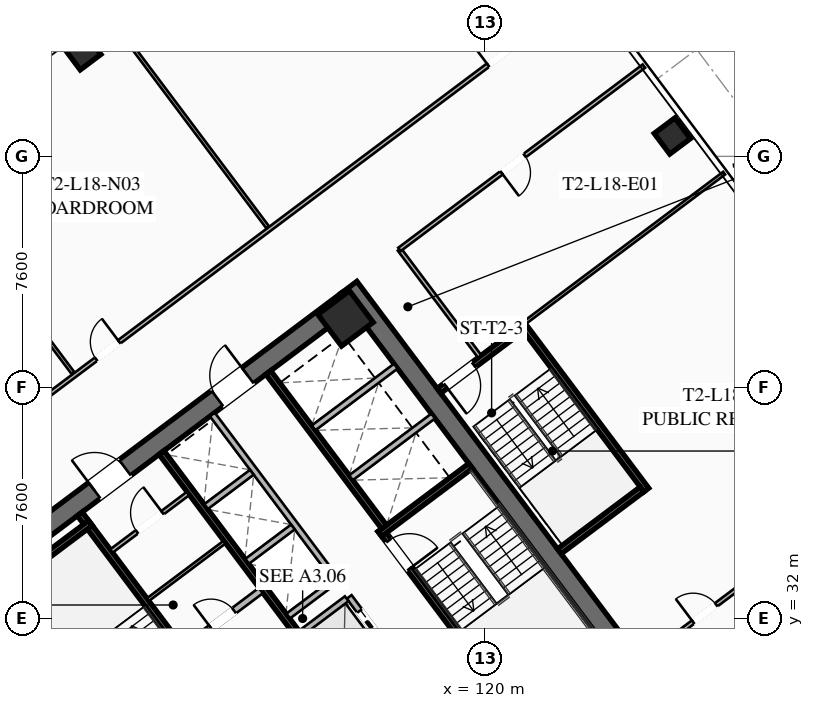
"""IFC4 building model, lengths in metres.
Left out: names, types, materials, properties, quantities, classifications, styles, units other than length and angle.
Written with IfcOpenShell. Run it as: python <this file> out.ifc"""

import sys

from ifc_helpers import new_model, si_unit, direction, frame, frame_2d, origin, origin_2d, place, context, subcontext, project, spatial, rectangle, hollow_rectangle, extrude, element, fill, save


model = new_model("IFC4")
c1 = context("Model", 3, precision=1e-05, world=origin(), true_north=direction((0.0, 1.0)))
c2 = subcontext(c1, "Body", "Model", "MODEL_VIEW")
j1 = project(units=[si_unit("LENGTHUNIT", "METRE"), si_unit("PLANEANGLEUNIT", "RADIAN")], contexts=[c1])
p1 = place(None, origin())
s1 = spatial("IfcSite", under=j1, at=p1, CompositionType="ELEMENT")
p2 = place(p1, origin())
s2 = spatial("IfcBuilding", under=s1, at=p2, CompositionType="ELEMENT")
p3 = place(p2, frame((0.0, 0.0, 70.75)))
s3 = spatial("IfcBuildingStorey", under=s2, at=p3, CompositionType="ELEMENT", Elevation=70.75)
for number, where, z_axis, x_axis in (
    (1, (112.476, 21.107, 0.0), (0.0, 0.0, 1.0), (-0.6, 0.8, 0.0)),
    (2, (115.524, 42.893, 0.0), (0.0, 0.0, 1.0), (0.6, -0.8, 0.0)),
):
    element("IfcWall", number, at=place(p3, frame(where, z_axis=z_axis, x_axis=x_axis)), inside=s3, PredefinedType="SHEAR", context=c2, shape_type="SweptSolid", body=[
        extrude(rectangle(XDim=15.6, YDim=0.65, at=frame_2d((7.8, 0.0))), origin(), (0.0, 0.0, 1.0), 3.55),
    ])
p4 = place(p3, frame((103.571, 33.522, 0.0), z_axis=(0.0, 0.0, 1.0), x_axis=(0.799998028465, 0.600002628705, 0.0)))
e3 = element("IfcWall", 3, at=p4, inside=s3, PredefinedType="SHEAR", context=c2, shape_type="SweptSolid", body=[
    extrude(rectangle(XDim=14.86, YDim=0.65, at=frame_2d((7.43, 0.0))), origin(), (0.0, 0.0, 1.0), 3.55),
])
p5 = place(p4, frame((4.48, 0.0, 0.0)))
e4 = element("IfcOpeningElement", 4, at=p5, cuts=e3, PredefinedType="OPENING", context=c2, shape_type="SweptSolid", body=[
    extrude(rectangle(XDim=1.25, YDim=2.25, at=frame_2d((0.625, 1.125))), frame((0.0, 0.335, 0.0), z_axis=(0.0, -1.0, 0.0), x_axis=(1.0, 0.0, 0.0)), (0.0, 0.0, 1.0), 0.67),
])
p6 = place(p4, frame((9.53, 0.0, 0.0)))
e5 = element("IfcOpeningElement", 5, at=p6, cuts=e3, PredefinedType="OPENING", context=c2, shape_type="SweptSolid", body=[
    extrude(rectangle(XDim=1.25, YDim=2.25, at=frame_2d((0.625, 1.125))), frame((0.0, 0.335, 0.0), z_axis=(0.0, -1.0, 0.0), x_axis=(1.0, 0.0, 0.0)), (0.0, 0.0, 1.0), 0.67),
])
p7 = place(p3, frame((115.41, 41.87, 0.0), z_axis=(0.0, 0.0, 1.0), x_axis=(0.799999996291, 0.600000004945, 0.0)))
e6 = element("IfcColumn", 6, at=p7, inside=s3, PredefinedType="COLUMN", context=c2, shape_type="SweptSolid", body=[
    extrude(hollow_rectangle(XDim=1.3, YDim=1.3, WallThickness=0.05, at=origin_2d()), origin(), (0.0, 0.0, 1.0), 3.35),
])
for number, where, z_axis, x_axis in (
    (7, (126.16, 47.87, 0.0), (0.0, 0.0, 1.0), (0.8, 0.6, 0.0)),
    (8, (106.77, 50.64, 0.0), (0.0, 0.0, 1.0), (0.8, 0.6, 0.0)),
):
    element("IfcColumn", number, at=place(p3, frame(where, z_axis=z_axis, x_axis=x_axis)), inside=s3, PredefinedType="COLUMN", context=c2, shape_type="SweptSolid", body=[
        extrude(hollow_rectangle(XDim=0.85, YDim=0.85, WallThickness=0.035, at=origin_2d()), origin(), (0.0, 0.0, 1.0), 3.35),
    ])
p8 = place(p3, frame((111.44, 29.08, 0.0), z_axis=(0.0, 0.0, 1.0), x_axis=(-0.600009827119, 0.799992629566, 0.0)))
e9 = element("IfcWall", 9, at=p8, inside=s3, PredefinedType="SHEAR", context=c2, shape_type="SweptSolid", body=[
    extrude(rectangle(XDim=7.95, YDim=0.2, at=frame_2d((3.975, 0.0))), origin(), (0.0, 0.0, 1.0), 3.35),
])
p9 = place(p8, frame((0.45, 0.0, 0.0)))
e10 = element("IfcOpeningElement", 10, at=p9, cuts=e9, PredefinedType="OPENING", context=c2, shape_type="SweptSolid", body=[
    extrude(rectangle(XDim=1.15, YDim=2.2, at=frame_2d((0.575, 1.1))), frame((0.0, 0.11, 0.0), z_axis=(0.0, -1.0, 0.0), x_axis=(1.0, 0.0, 0.0)), (0.0, 0.0, 1.0), 0.22),
])
p10 = place(p3, frame((104.036, 32.902, 0.0), z_axis=(0.0, 0.0, 1.0), x_axis=(0.800039270442, 0.59994763584, 0.0)))
e11 = element("IfcWall", 11, at=p10, inside=s3, PredefinedType="SHEAR", context=c2, shape_type="SweptSolid", body=[
    extrude(rectangle(XDim=3.73, YDim=0.2, at=frame_2d((1.865, 0.0))), origin(), (0.0, 0.0, 1.0), 3.35),
])
p11 = place(p3, frame((116.56, 34.92, 0.0), z_axis=(0.0, 0.0, 1.0), x_axis=(0.600009827119, -0.799992629566, 0.0)))
e12 = element("IfcWall", 12, at=p11, inside=s3, PredefinedType="SHEAR", context=c2, shape_type="SweptSolid", body=[
    extrude(rectangle(XDim=7.95, YDim=0.2, at=frame_2d((3.975, 0.0))), origin(), (0.0, 0.0, 1.0), 3.35),
])
p12 = place(p11, frame((0.45, 0.0, 0.0)))
e13 = element("IfcOpeningElement", 13, at=p12, cuts=e12, PredefinedType="OPENING", context=c2, shape_type="SweptSolid", body=[
    extrude(rectangle(XDim=1.15, YDim=2.2, at=frame_2d((0.575, 1.1))), frame((0.0, 0.11, 0.0), z_axis=(0.0, -1.0, 0.0), x_axis=(1.0, 0.0, 0.0)), (0.0, 0.0, 1.0), 0.22),
])
p13 = place(p3, frame((116.54, 34.78, 0.0), z_axis=(0.0, 0.0, 1.0), x_axis=(0.799984290658, 0.600020945218, 0.0)))
e14 = element("IfcWall", 14, at=p13, inside=s3, PredefinedType="SHEAR", context=c2, shape_type="SweptSolid", body=[
    extrude(rectangle(XDim=3.73, YDim=0.2, at=frame_2d((1.865, 0.0))), origin(), (0.0, 0.0, 1.0), 3.35),
])
p14 = place(p3, frame((117.938, 26.016, 0.0), z_axis=(0.0, 0.0, 1.0), x_axis=(-0.600005463273, 0.799995902516, 0.0)))
e15 = element("IfcWall", 15, at=p14, inside=s3, PredefinedType="SHEAR", context=c2, shape_type="SweptSolid", body=[
    extrude(rectangle(XDim=14.3, YDim=0.2, at=frame_2d((7.15, 0.0))), origin(), (0.0, 0.0, 1.0), 3.35),
])
p15 = place(p3, frame((110.104, 31.028, 0.0), z_axis=(0.0, 0.0, 1.0), x_axis=(0.800018601094, 0.59997519774, 0.0)))
e16 = element("IfcWall", 16, at=p15, inside=s3, PredefinedType="SOLIDWALL", context=c2, shape_type="SweptSolid", body=[
    extrude(rectangle(XDim=3.15, YDim=0.22, at=frame_2d((1.575, 0.0))), origin(), (0.0, 0.0, 1.0), 2.703),
])
p16 = place(p15, frame((1.1, 0.0, 0.0)))
e17 = element("IfcOpeningElement", 17, at=p16, cuts=e16, PredefinedType="OPENING", context=c2, shape_type="SweptSolid", body=[
    extrude(rectangle(XDim=0.95, YDim=2.05, at=frame_2d((0.475, 1.025))), frame((0.0, 0.12, 0.0), z_axis=(0.0, -1.0, 0.0), x_axis=(1.0, 0.0, 0.0)), (0.0, 0.0, 1.0), 0.24),
])
p17 = place(p3, frame((112.87, 40.09, 0.0), z_axis=(0.0, 0.0, 1.0), x_axis=(0.599975393228, -0.800018454488, 0.0)))
e18 = element("IfcWall", 18, at=p17, inside=s3, PredefinedType="SHEAR", context=c2, shape_type="SweptSolid", body=[
    extrude(rectangle(XDim=6.35, YDim=0.2, at=frame_2d((3.175, 0.0))), origin(), (0.0, 0.0, 1.0), 3.35),
])
for number, where, z_axis, x_axis in (
    (19, (115.59, 36.63, 0.0), (0.0, 0.0, 1.0), (0.8, 0.6, 0.0)),
    (20, (114.36, 38.27, 0.0), (0.0, 0.0, 1.0), (0.8, 0.6, 0.0)),
):
    element("IfcWall", number, at=place(p3, frame(where, z_axis=z_axis, x_axis=x_axis)), inside=s3, PredefinedType="SOLIDWALL", context=c2, shape_type="SweptSolid", body=[
        extrude(rectangle(XDim=3.38, YDim=0.2, at=frame_2d((1.69, 0.0))), origin(), (0.0, 0.0, 1.0), 3.35),
    ])
p18 = place(p3, frame((107.71, 34.22, 0.0), z_axis=(0.0, 0.0, 1.0), x_axis=(0.799981399002, 0.60002480053, 0.0)))
e21 = element("IfcWall", 21, at=p18, inside=s3, PredefinedType="PARTITIONING", context=c2, shape_type="SweptSolid", body=[
    extrude(rectangle(XDim=3.15, YDim=0.135, at=frame_2d((1.575, 0.0))), origin(), (0.0, 0.0, 1.0), 2.703),
])
p19 = place(p18, frame((1.05, 0.0, 0.0)))
e22 = element("IfcOpeningElement", 22, at=p19, cuts=e21, PredefinedType="OPENING", context=c2, shape_type="SweptSolid", body=[
    extrude(rectangle(XDim=1.05, YDim=2.2, at=frame_2d((0.525, 1.1))), frame((0.0, 0.077, 0.0), z_axis=(0.0, -1.0, 0.0), x_axis=(1.0, 0.0, 0.0)), (0.0, 0.0, 1.0), 0.155),
])
p20 = place(p3, frame((108.91, 32.62, 0.0), z_axis=(0.0, 0.0, 1.0), x_axis=(0.800018601094, 0.59997519774, 0.0)))
e23 = element("IfcWall", 23, at=p20, inside=s3, PredefinedType="PARTITIONING", context=c2, shape_type="SweptSolid", body=[
    extrude(rectangle(XDim=3.15, YDim=0.11, at=frame_2d((1.575, 0.0))), origin(), (0.0, 0.0, 1.0), 2.703),
])
p21 = place(p3, frame((119.61, 27.27, 0.0), z_axis=(0.0, 0.0, 1.0), x_axis=(-0.600011488909, 0.79999138319, 0.0)))
e24 = element("IfcWall", 24, at=p21, inside=s3, PredefinedType="SOLIDWALL", context=c2, shape_type="SweptSolid", body=[
    extrude(rectangle(XDim=6.8, YDim=0.2, at=frame_2d((3.4, 0.0))), origin(), (0.0, 0.0, 1.0), 3.35),
])
p22 = place(p21, frame((0.625, 0.0, 0.0)))
e25 = element("IfcOpeningElement", 25, at=p22, cuts=e24, PredefinedType="OPENING", context=c2, shape_type="SweptSolid", body=[
    extrude(rectangle(XDim=1.1, YDim=2.2, at=frame_2d((0.55, 1.1))), frame((0.0, 0.11, 0.0), z_axis=(0.0, -1.0, 0.0), x_axis=(1.0, 0.0, 0.0)), (0.0, 0.0, 1.0), 0.22),
])
p23 = place(p21, frame((2.875, 0.0, 0.0)))
e26 = element("IfcOpeningElement", 26, at=p23, cuts=e24, PredefinedType="OPENING", context=c2, shape_type="SweptSolid", body=[
    extrude(rectangle(XDim=1.1, YDim=2.2, at=frame_2d((0.55, 1.1))), frame((0.0, 0.11, 0.0), z_axis=(0.0, -1.0, 0.0), x_axis=(1.0, 0.0, 0.0)), (0.0, 0.0, 1.0), 0.22),
])
p24 = place(p21, frame((5.125, 0.0, 0.0)))
e27 = element("IfcOpeningElement", 27, at=p24, cuts=e24, PredefinedType="OPENING", context=c2, shape_type="SweptSolid", body=[
    extrude(rectangle(XDim=1.1, YDim=2.2, at=frame_2d((0.55, 1.1))), frame((0.0, 0.11, 0.0), z_axis=(0.0, -1.0, 0.0), x_axis=(1.0, 0.0, 0.0)), (0.0, 0.0, 1.0), 0.22),
])
p25 = place(p3, frame((113.946, 31.522, 0.0), z_axis=(0.0, 0.0, 1.0), x_axis=(0.8, 0.6, 0.0)))
e28 = element("IfcWall", 28, at=p25, inside=s3, PredefinedType="SOLIDWALL", context=c2, shape_type="SweptSolid", body=[
    extrude(rectangle(XDim=1.88, YDim=0.2, at=frame_2d((0.94, 0.0))), origin(), (0.0, 0.0, 1.0), 3.35),
])
p26 = place(p3, frame((115.11, 33.27, 0.0), z_axis=(0.0, 0.0, 1.0), x_axis=(-0.600011488909, 0.79999138319, 0.0)))
e29 = element("IfcWall", 29, at=p26, inside=s3, PredefinedType="SOLIDWALL", context=c2, shape_type="SweptSolid", body=[
    extrude(rectangle(XDim=6.8, YDim=0.2, at=frame_2d((3.4, 0.0))), origin(), (0.0, 0.0, 1.0), 3.35),
])
p27 = place(p3, frame((113.526, 32.082, 0.0), z_axis=(0.0, 0.0, 1.0), x_axis=(0.800046745961, 0.599937666993, 0.0)))
e30 = element("IfcWall", 30, at=p27, inside=s3, PredefinedType="SOLIDWALL", context=c2, shape_type="SweptSolid", body=[
    extrude(rectangle(XDim=1.88, YDim=0.2, at=frame_2d((0.94, 0.0))), origin(), (0.0, 0.0, 1.0), 3.35),
])
p28 = place(p3, frame((112.176, 33.882, 0.0), z_axis=(0.0, 0.0, 1.0), x_axis=(0.8, 0.6, 0.0)))
e31 = element("IfcWall", 31, at=p28, inside=s3, PredefinedType="SOLIDWALL", context=c2, shape_type="SweptSolid", body=[
    extrude(rectangle(XDim=1.88, YDim=0.2, at=frame_2d((0.94, 0.0))), origin(), (0.0, 0.0, 1.0), 3.35),
])
p29 = place(p3, frame((110.826, 35.682, 0.0), z_axis=(0.0, 0.0, 1.0), x_axis=(0.799984418148, 0.600020775241, 0.0)))
e32 = element("IfcWall", 32, at=p29, inside=s3, PredefinedType="SOLIDWALL", context=c2, shape_type="SweptSolid", body=[
    extrude(rectangle(XDim=1.88, YDim=0.2, at=frame_2d((0.94, 0.0))), origin(), (0.0, 0.0, 1.0), 3.35),
])
p30 = place(p3, frame((125.304, 36.228, 0.0), z_axis=(0.0, 0.0, 1.0), x_axis=(-0.59998851072, 0.800008616831, 0.0)))
e33 = element("IfcWall", 33, at=p30, inside=s3, PredefinedType="SHEAR", context=c2, shape_type="SweptSolid", body=[
    extrude(rectangle(XDim=6.8, YDim=0.2, at=frame_2d((3.4, 0.0))), origin(), (0.0, 0.0, 1.0), 3.35),
])
p31 = place(p3, frame((121.204, 41.528, 0.0), z_axis=(0.0, 0.0, 1.0), x_axis=(-0.800017232136, -0.599977023131, 0.0)))
e34 = element("IfcWall", 34, at=p31, inside=s3, PredefinedType="SHEAR", context=c2, shape_type="SweptSolid", body=[
    extrude(rectangle(XDim=3.4, YDim=0.2, at=frame_2d((1.7, 0.0))), origin(), (0.0, 0.0, 1.0), 3.35),
])
p32 = place(p31, frame((1.975, 0.0, 0.0)))
e35 = element("IfcOpeningElement", 35, at=p32, cuts=e34, PredefinedType="OPENING", context=c2, shape_type="SweptSolid", body=[
    extrude(rectangle(XDim=1.15, YDim=2.2, at=frame_2d((0.575, 1.1))), frame((0.0, 0.11, 0.0), z_axis=(0.0, -1.0, 0.0), x_axis=(1.0, 0.0, 0.0)), (0.0, 0.0, 1.0), 0.22),
])
p33 = place(p3, frame((122.444, 34.208, 0.0), z_axis=(0.0, 0.0, 1.0), x_axis=(0.79999138319, 0.600011488909, 0.0)))
e36 = element("IfcWall", 36, at=p33, inside=s3, PredefinedType="SHEAR", context=c2, shape_type="SweptSolid", body=[
    extrude(rectangle(XDim=3.4, YDim=0.2, at=frame_2d((1.7, 0.0))), origin(), (0.0, 0.0, 1.0), 3.35),
])
p34 = place(p3, frame((119.824, 40.618, 0.0), z_axis=(0.0, 0.0, 1.0), x_axis=(-0.599982243973, 0.800013316712, 0.0)))
e37 = element("IfcWall", 37, at=p34, inside=s3, PredefinedType="PARTITIONING", context=c2, shape_type="SweptSolid", body=[
    extrude(rectangle(XDim=4.4, YDim=0.135, at=frame_2d((2.2, 0.0))), origin(), (0.0, 0.0, 1.0), 2.703),
])
p35 = place(p3, frame((98.516, 34.012, 0.0), z_axis=(0.0, 0.0, 1.0), x_axis=(0.8, 0.6, 0.0)))
e38 = element("IfcWall", 38, at=p35, inside=s3, PredefinedType="PARTITIONING", context=c2, shape_type="SweptSolid", body=[
    extrude(rectangle(XDim=28.23, YDim=0.135, at=frame_2d((14.115, 0.0))), origin(), (0.0, 0.0, 1.0), 2.703),
])
p36 = place(p35, frame((0.3, 0.0, 0.0)))
e39 = element("IfcOpeningElement", 39, at=p36, cuts=e38, PredefinedType="OPENING", context=c2, shape_type="SweptSolid", body=[
    extrude(rectangle(XDim=0.95, YDim=2.05, at=frame_2d((0.475, 1.025))), frame((0.0, 0.077, 0.0), z_axis=(0.0, -1.0, 0.0), x_axis=(1.0, 0.0, 0.0)), (0.0, 0.0, 1.0), 0.155),
])
p37 = place(p35, frame((6.84, 0.0, 0.0)))
e40 = element("IfcOpeningElement", 40, at=p37, cuts=e38, PredefinedType="OPENING", context=c2, shape_type="SweptSolid", body=[
    extrude(rectangle(XDim=0.95, YDim=2.05, at=frame_2d((0.475, 1.025))), frame((0.0, 0.077, 0.0), z_axis=(0.0, -1.0, 0.0), x_axis=(1.0, 0.0, 0.0)), (0.0, 0.0, 1.0), 0.155),
])
p38 = place(p35, frame((10.863, 0.0, 0.0)))
e41 = element("IfcOpeningElement", 41, at=p38, cuts=e38, PredefinedType="OPENING", context=c2, shape_type="SweptSolid", body=[
    extrude(rectangle(XDim=0.95, YDim=2.05, at=frame_2d((0.475, 1.025))), frame((0.0, 0.077, 0.0), z_axis=(0.0, -1.0, 0.0), x_axis=(1.0, 0.0, 0.0)), (0.0, 0.0, 1.0), 0.155),
])
p39 = place(p35, frame((26.98, 0.0, 0.0)))
e42 = element("IfcOpeningElement", 42, at=p39, cuts=e38, PredefinedType="OPENING", context=c2, shape_type="SweptSolid", body=[
    extrude(rectangle(XDim=0.95, YDim=2.05, at=frame_2d((0.475, 1.025))), frame((0.0, 0.077, 0.0), z_axis=(0.0, -1.0, 0.0), x_axis=(1.0, 0.0, 0.0)), (0.0, 0.0, 1.0), 0.155),
])
for number, where, z_axis, x_axis in (
    (43, (106.452, 40.064, 0.0), (0.0, 0.0, 1.0), (-0.6, 0.8, 0.0)),
    (44, (112.852, 44.864, 0.0), (0.0, 0.0, 1.0), (-0.6, 0.8, 0.0)),
):
    element("IfcWall", number, at=place(p3, frame(where, z_axis=z_axis, x_axis=x_axis)), inside=s3, PredefinedType="PARTITIONING", context=c2, shape_type="SweptSolid", body=[
        extrude(rectangle(XDim=8.9, YDim=0.11, at=frame_2d((4.45, 0.0))), origin(), (0.0, 0.0, 1.0), 2.703),
    ])
p40 = place(p3, frame((134.18, 33.51, 0.0), z_axis=(0.0, 0.0, 1.0), x_axis=(-0.8, -0.6, 0.0)))
e45 = element("IfcWall", 45, at=p40, inside=s3, PredefinedType="PARTITIONING", context=c2, shape_type="SweptSolid", body=[
    extrude(rectangle(XDim=28.23, YDim=0.135, at=frame_2d((14.115, 0.0))), origin(), (0.0, 0.0, 1.0), 2.703),
])
p41 = place(p40, frame((26.9, 0.0, 0.0)))
e46 = element("IfcOpeningElement", 46, at=p41, cuts=e45, PredefinedType="OPENING", context=c2, shape_type="SweptSolid", body=[
    extrude(rectangle(XDim=0.95, YDim=2.05, at=frame_2d((0.475, 1.025))), frame((0.0, 0.077, 0.0), z_axis=(0.0, -1.0, 0.0), x_axis=(1.0, 0.0, 0.0)), (0.0, 0.0, 1.0), 0.155),
])
p42 = place(p40, frame((20.399, 0.0, 0.0)))
e47 = element("IfcOpeningElement", 47, at=p42, cuts=e45, PredefinedType="OPENING", context=c2, shape_type="SweptSolid", body=[
    extrude(rectangle(XDim=0.95, YDim=2.05, at=frame_2d((0.475, 1.025))), frame((0.0, 0.077, 0.0), z_axis=(0.0, -1.0, 0.0), x_axis=(1.0, 0.0, 0.0)), (0.0, 0.0, 1.0), 0.155),
])
p43 = place(p40, frame((16.339, 0.0, 0.0)))
e48 = element("IfcOpeningElement", 48, at=p43, cuts=e45, PredefinedType="OPENING", context=c2, shape_type="SweptSolid", body=[
    extrude(rectangle(XDim=0.95, YDim=2.05, at=frame_2d((0.475, 1.025))), frame((0.0, 0.077, 0.0), z_axis=(0.0, -1.0, 0.0), x_axis=(1.0, 0.0, 0.0)), (0.0, 0.0, 1.0), 0.155),
])
p44 = place(p40, frame((0.38, 0.0, 0.0)))
e49 = element("IfcOpeningElement", 49, at=p44, cuts=e45, PredefinedType="OPENING", context=c2, shape_type="SweptSolid", body=[
    extrude(rectangle(XDim=0.95, YDim=2.05, at=frame_2d((0.475, 1.025))), frame((0.0, 0.077, 0.0), z_axis=(0.0, -1.0, 0.0), x_axis=(1.0, 0.0, 0.0)), (0.0, 0.0, 1.0), 0.155),
])
p45 = place(p3, frame((125.224, 50.168, 0.0), z_axis=(0.0, 0.0, 1.0), x_axis=(-0.8, -0.6, 0.0)))
e50 = element("IfcWall", 50, at=p45, inside=s3, PredefinedType="PARTITIONING", context=c2, shape_type="SweptSolid", body=[
    extrude(rectangle(XDim=10.05, YDim=0.135, at=frame_2d((5.025, 0.0))), origin(), (0.0, 0.0, 1.0), 2.703),
])
p46 = place(p45, frame((4.9, 0.0, 0.0)))
e51 = element("IfcOpeningElement", 51, at=p46, cuts=e50, PredefinedType="OPENING", context=c2, shape_type="SweptSolid", body=[
    extrude(rectangle(XDim=0.95, YDim=2.05, at=frame_2d((0.475, 1.025))), frame((0.0, 0.077, 0.0), z_axis=(0.0, -1.0, 0.0), x_axis=(1.0, 0.0, 0.0)), (0.0, 0.0, 1.0), 0.155),
])
p47 = place(p3, frame((125.208, 30.656, 0.0), z_axis=(0.0, 0.0, 1.0), x_axis=(0.8, 0.6, 0.0)))
e52 = element("IfcWall", 52, at=p47, inside=s3, PredefinedType="PARTITIONING", context=c2, shape_type="SweptSolid", body=[
    extrude(rectangle(XDim=11.72, YDim=0.135, at=frame_2d((5.86, 0.0))), origin(), (0.0, 0.0, 1.0), 2.703),
])
p48 = place(p47, frame((2.045, 0.0, 0.0)))
e53 = element("IfcOpeningElement", 53, at=p48, cuts=e52, PredefinedType="OPENING", context=c2, shape_type="SweptSolid", body=[
    extrude(rectangle(XDim=0.95, YDim=2.05, at=frame_2d((0.475, 1.025))), frame((0.0, 0.077, 0.0), z_axis=(0.0, -1.0, 0.0), x_axis=(1.0, 0.0, 0.0)), (0.0, 0.0, 1.0), 0.155),
])
p49 = place(p3, frame((127.864, 46.648, 0.0), z_axis=(0.0, 0.0, 1.0), x_axis=(-0.800007145523, -0.599990472518, 0.0)))
e54 = element("IfcWall", 54, at=p49, inside=s3, PredefinedType="PARTITIONING", context=c2, shape_type="SweptSolid", body=[
    extrude(rectangle(XDim=8.2, YDim=0.11, at=frame_2d((4.1, 0.0))), origin(), (0.0, 0.0, 1.0), 2.703),
])
p50 = place(p3, frame((111.548, 16.636, 0.0), z_axis=(0.0, 0.0, 1.0), x_axis=(-0.600003610192, 0.799997292343, 0.0)))
e55 = element("IfcWall", 55, at=p50, inside=s3, PredefinedType="PARTITIONING", context=c2, shape_type="SweptSolid", body=[
    extrude(rectangle(XDim=21.64, YDim=0.135, at=frame_2d((10.82, 0.0))), origin(), (0.0, 0.0, 1.0), 2.703),
])
p51 = place(p50, frame((0.3, 0.0, 0.0)))
e56 = element("IfcOpeningElement", 56, at=p51, cuts=e55, PredefinedType="OPENING", context=c2, shape_type="SweptSolid", body=[
    extrude(rectangle(XDim=0.95, YDim=2.05, at=frame_2d((0.475, 1.025))), frame((0.0, 0.077, 0.0), z_axis=(0.0, -1.0, 0.0), x_axis=(1.0, 0.0, 0.0)), (0.0, 0.0, 1.0), 0.155),
])
p52 = place(p5, origin())
e57 = element("IfcDoor", 57, at=p52, inside=s3, OperationType="SINGLE_SWING_LEFT", PredefinedType="DOOR", context=c2, shape_type="SweptSolid", body=[
    extrude(rectangle(XDim=1.25, YDim=2.25, at=frame_2d((0.625, 1.125))), frame((0.0, 0.025, 0.0), z_axis=(0.0, -1.0, 0.0), x_axis=(1.0, 0.0, 0.0)), (0.0, 0.0, 1.0), 0.05),
])
fill(e4, e57)
p53 = place(p6, origin())
e58 = element("IfcDoor", 58, at=p53, inside=s3, OperationType="SINGLE_SWING_RIGHT", PredefinedType="DOOR", context=c2, shape_type="SweptSolid", body=[
    extrude(rectangle(XDim=1.25, YDim=2.25, at=frame_2d((0.625, 1.125))), frame((0.0, 0.025, 0.0), z_axis=(0.0, -1.0, 0.0), x_axis=(1.0, 0.0, 0.0)), (0.0, 0.0, 1.0), 0.05),
])
fill(e5, e58)
p54 = place(p12, origin())
e59 = element("IfcDoor", 59, at=p54, inside=s3, OperationType="SINGLE_SWING_RIGHT", PredefinedType="DOOR", context=c2, shape_type="SweptSolid", body=[
    extrude(rectangle(XDim=1.15, YDim=2.2, at=frame_2d((0.575, 1.1))), frame((0.0, 0.025, 0.0), z_axis=(0.0, -1.0, 0.0), x_axis=(1.0, 0.0, 0.0)), (0.0, 0.0, 1.0), 0.05),
])
fill(e13, e59)
p55 = place(p19, origin())
e60 = element("IfcDoor", 60, at=p55, inside=s3, OperationType="SINGLE_SWING_RIGHT", PredefinedType="DOOR", context=c2, shape_type="SweptSolid", body=[
    extrude(rectangle(XDim=1.05, YDim=2.2, at=frame_2d((0.525, 1.1))), frame((0.0, 0.025, 0.0), z_axis=(0.0, -1.0, 0.0), x_axis=(1.0, 0.0, 0.0)), (0.0, 0.0, 1.0), 0.05),
])
fill(e22, e60)
p56 = place(p16, origin())
e61 = element("IfcDoor", 61, at=p56, inside=s3, OperationType="SINGLE_SWING_LEFT", PredefinedType="DOOR", context=c2, shape_type="SweptSolid", body=[
    extrude(rectangle(XDim=0.95, YDim=2.05, at=frame_2d((0.475, 1.025))), frame((0.0, 0.025, 0.0), z_axis=(0.0, -1.0, 0.0), x_axis=(1.0, 0.0, 0.0)), (0.0, 0.0, 1.0), 0.05),
])
fill(e17, e61)
p57 = place(p32, origin())
e62 = element("IfcDoor", 62, at=p57, inside=s3, OperationType="SINGLE_SWING_RIGHT", PredefinedType="DOOR", context=c2, shape_type="SweptSolid", body=[
    extrude(rectangle(XDim=1.15, YDim=2.2, at=frame_2d((0.575, 1.1))), frame((0.0, 0.025, 0.0), z_axis=(0.0, -1.0, 0.0), x_axis=(1.0, 0.0, 0.0)), (0.0, 0.0, 1.0), 0.05),
])
fill(e35, e62)
p58 = place(p38, origin())
e63 = element("IfcDoor", 63, at=p58, inside=s3, OperationType="SINGLE_SWING_RIGHT", PredefinedType="DOOR", context=c2, shape_type="SweptSolid", body=[
    extrude(rectangle(XDim=0.95, YDim=2.05, at=frame_2d((0.475, 1.025))), frame((0.0, 0.025, 0.0), z_axis=(0.0, -1.0, 0.0), x_axis=(1.0, 0.0, 0.0)), (0.0, 0.0, 1.0), 0.05),
])
fill(e41, e63)
p59 = place(p39, origin())
e64 = element("IfcDoor", 64, at=p59, inside=s3, OperationType="SINGLE_SWING_LEFT", PredefinedType="DOOR", context=c2, shape_type="SweptSolid", body=[
    extrude(rectangle(XDim=0.95, YDim=2.05, at=frame_2d((0.475, 1.025))), frame((0.0, 0.025, 0.0), z_axis=(0.0, -1.0, 0.0), x_axis=(1.0, 0.0, 0.0)), (0.0, 0.0, 1.0), 0.05),
])
fill(e42, e64)
p60 = place(p46, origin())
e65 = element("IfcDoor", 65, at=p60, inside=s3, OperationType="SINGLE_SWING_RIGHT", PredefinedType="DOOR", context=c2, shape_type="SweptSolid", body=[
    extrude(rectangle(XDim=0.95, YDim=2.05, at=frame_2d((0.475, 1.025))), frame((0.0, 0.025, 0.0), z_axis=(0.0, -1.0, 0.0), x_axis=(1.0, 0.0, 0.0)), (0.0, 0.0, 1.0), 0.05),
])
fill(e51, e65)
p61 = place(p48, origin())
e66 = element("IfcDoor", 66, at=p61, inside=s3, OperationType="SINGLE_SWING_LEFT", PredefinedType="DOOR", context=c2, shape_type="SweptSolid", body=[
    extrude(rectangle(XDim=0.95, YDim=2.05, at=frame_2d((0.475, 1.025))), frame((0.0, 0.025, 0.0), z_axis=(0.0, -1.0, 0.0), x_axis=(1.0, 0.0, 0.0)), (0.0, 0.0, 1.0), 0.05),
])
fill(e53, e66)
p62 = place(p24, origin())
e67 = element("IfcDoor", 67, at=p62, inside=s3, OperationType="SLIDING_TO_LEFT", PredefinedType="DOOR", context=c2, shape_type="SweptSolid", body=[
    extrude(rectangle(XDim=1.1, YDim=2.2, at=frame_2d((0.55, 1.1))), frame((0.0, 0.025, 0.0), z_axis=(0.0, -1.0, 0.0), x_axis=(1.0, 0.0, 0.0)), (0.0, 0.0, 1.0), 0.05),
])
fill(e27, e67)
save(model, sys.argv[1])
